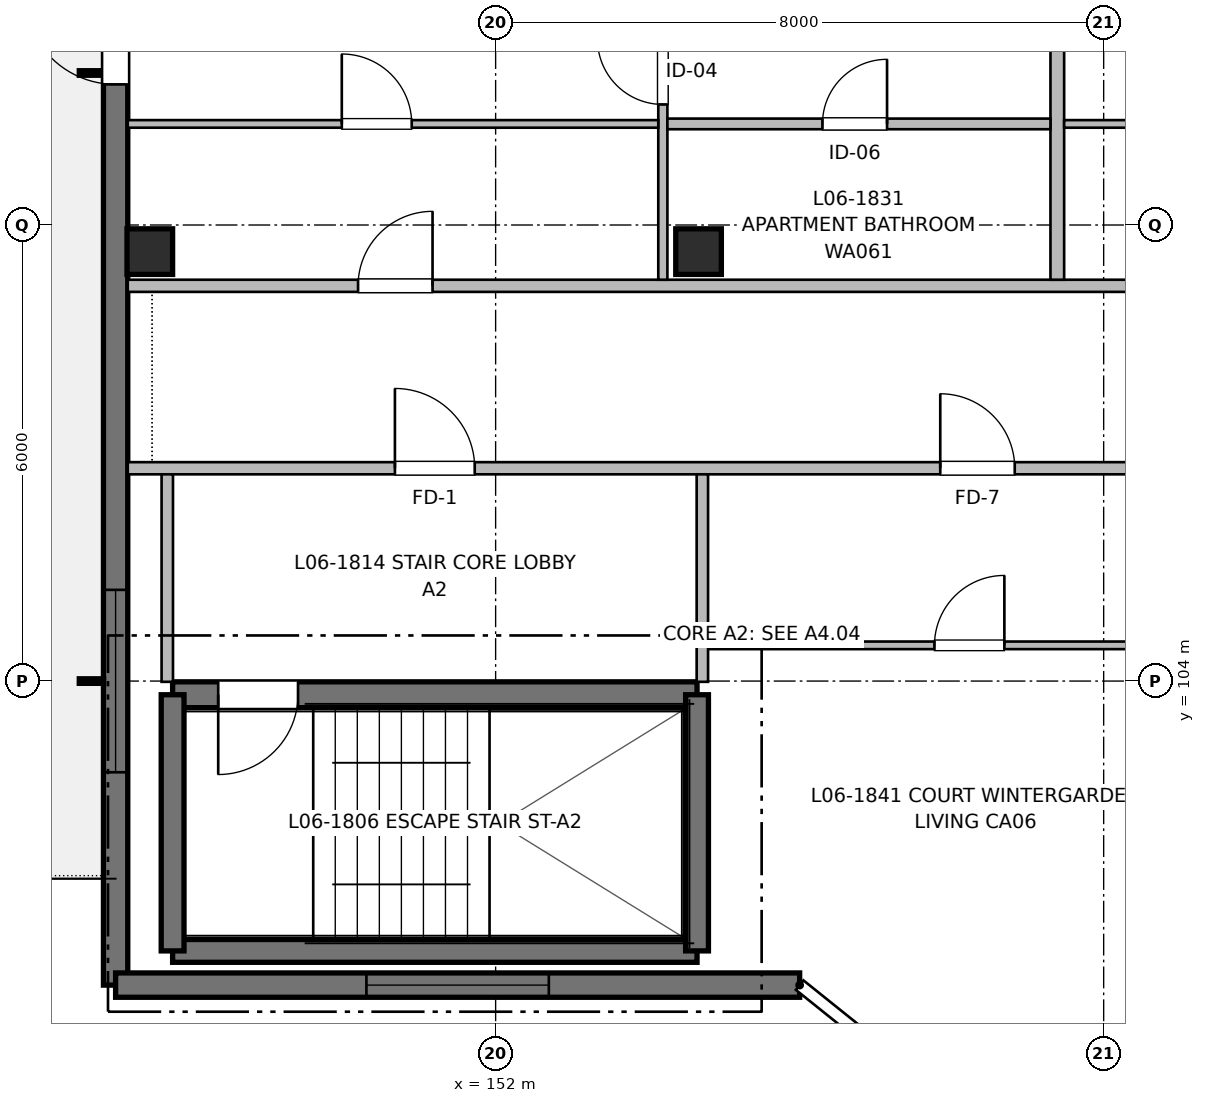
"""IFC4 building model, lengths in metres.
Left out: names, types, materials, properties, quantities, classifications, styles, units other than length and angle.
Written with IfcOpenShell. Run it as: python <this file> out.ifc"""

import sys

from ifc_helpers import new_model, si_unit, direction, frame, frame_2d, origin, origin_2d, place, context, subcontext, project, spatial, rectangle, extrude, element, fill, save


model = new_model("IFC4")
c1 = context("Model", 3, precision=1e-05, world=origin(), true_north=direction((0.0, 1.0)))
c2 = subcontext(c1, "Body", "Model", "MODEL_VIEW")
j1 = project(units=[si_unit("LENGTHUNIT", "METRE"), si_unit("PLANEANGLEUNIT", "RADIAN")], contexts=[c1])
p1 = place(None, origin())
s1 = spatial("IfcSite", under=j1, at=p1, CompositionType="ELEMENT")
p2 = place(p1, origin())
s2 = spatial("IfcBuilding", under=s1, at=p2, CompositionType="ELEMENT")
p3 = place(p2, frame((0.0, 0.0, 20.16)))
s3 = spatial("IfcBuildingStorey", under=s2, at=p3, CompositionType="ELEMENT", Elevation=20.16)
for number, where, z_axis, x_axis in (
    (1, (147.45, 109.65, 0.0), (0.0, 0.0, 1.0), (1.0, 0.0, 0.0)),
    (2, (154.67, 109.65, 0.0), (0.0, 0.0, 1.0), (1.0, 0.0, 0.0)),
):
    element("IfcColumn", number, at=place(p3, frame(where, z_axis=z_axis, x_axis=x_axis)), inside=s3, PredefinedType="COLUMN", context=c2, shape_type="SweptSolid", body=[
        extrude(rectangle(XDim=0.6, YDim=0.6, at=origin_2d()), origin(), (0.0, 0.0, 1.0), 3.2),
    ])
p4 = place(p3, frame((147.75, 100.45, 0.0), z_axis=(0.0, 0.0, 1.0), x_axis=(1.0, 0.0, 0.0)))
e3 = element("IfcWall", 3, at=p4, inside=s3, PredefinedType="SHEAR", context=c2, shape_type="SweptSolid", body=[
    extrude(rectangle(XDim=6.9, YDim=0.3, at=frame_2d((3.45, 0.0))), origin(), (0.0, 0.0, 1.0), 3.2),
])
p5 = place(p3, frame((154.65, 103.82, 0.0), z_axis=(0.0, 0.0, 1.0), x_axis=(-1.0, 0.0, 0.0)))
e4 = element("IfcWall", 4, at=p5, inside=s3, PredefinedType="SHEAR", context=c2, shape_type="SweptSolid", body=[
    extrude(rectangle(XDim=6.9, YDim=0.34, at=frame_2d((3.45, 0.0))), origin(), (0.0, 0.0, 1.0), 3.2),
])
p6 = place(p5, frame((5.25, 0.0, 0.0)))
e5 = element("IfcOpeningElement", 5, at=p6, cuts=e4, PredefinedType="OPENING", context=c2, shape_type="SweptSolid", body=[
    extrude(rectangle(XDim=1.05, YDim=2.15, at=frame_2d((0.525, 1.075))), frame((0.0, 0.18, 0.0), z_axis=(0.0, -1.0, 0.0), x_axis=(1.0, 0.0, 0.0)), (0.0, 0.0, 1.0), 0.36),
])
for number, where, z_axis, x_axis in (
    (6, (147.75, 103.82, 0.0), (0.0, 0.0, 1.0), (0.0, -1.0, 0.0)),
    (7, (154.65, 100.45, 0.0), (0.0, 0.0, 1.0), (0.0, 1.0, 0.0)),
):
    element("IfcWall", number, at=place(p3, frame(where, z_axis=z_axis, x_axis=x_axis)), inside=s3, PredefinedType="SHEAR", context=c2, shape_type="SweptSolid", body=[
        extrude(rectangle(XDim=3.37, YDim=0.3, at=frame_2d((1.685, 0.0))), origin(), (0.0, 0.0, 1.0), 3.2),
    ])
p7 = place(p3, frame((147.0, 100.0, 0.0), z_axis=(0.0, 0.0, 1.0), x_axis=(0.0, 1.0, 0.0)))
e8 = element("IfcWall", 8, at=p7, inside=s3, PredefinedType="SHEAR", context=c2, shape_type="SweptSolid", body=[
    extrude(rectangle(XDim=16.0, YDim=0.32, at=frame_2d((8.0, 0.0))), origin(), (0.0, 0.0, 1.0), 2.98),
])
p8 = place(p7, frame((2.8, 0.0, 0.72)))
e9 = element("IfcOpeningElement", 9, at=p8, cuts=e8, PredefinedType="OPENING", context=c2, shape_type="SweptSolid", body=[
    extrude(rectangle(XDim=2.4, YDim=1.5, at=frame_2d((1.2, 0.75))), frame((0.0, 0.17, 0.0), z_axis=(0.0, -1.0, 0.0), x_axis=(1.0, 0.0, 0.0)), (0.0, 0.0, 1.0), 0.34),
])
p9 = place(p7, frame((11.85, 0.0, 0.0)))
e10 = element("IfcOpeningElement", 10, at=p9, cuts=e8, PredefinedType="OPENING", context=c2, shape_type="SweptSolid", body=[
    extrude(rectangle(XDim=1.2, YDim=2.2, at=frame_2d((0.6, 1.1))), frame((0.0, 0.17, 0.0), z_axis=(0.0, -1.0, 0.0), x_axis=(1.0, 0.0, 0.0)), (0.0, 0.0, 1.0), 0.34),
])
p10 = place(p3, frame((156.0, 100.0, 0.0), z_axis=(0.0, 0.0, 1.0), x_axis=(-1.0, 0.0, 0.0)))
e11 = element("IfcWall", 11, at=p10, inside=s3, PredefinedType="SHEAR", context=c2, shape_type="SweptSolid", body=[
    extrude(rectangle(XDim=9.0, YDim=0.32, at=frame_2d((4.5, 0.0))), origin(), (0.0, 0.0, 1.0), 2.98),
])
p11 = place(p10, frame((3.3, 0.0, 0.72)))
e12 = element("IfcOpeningElement", 12, at=p11, cuts=e11, PredefinedType="OPENING", context=c2, shape_type="SweptSolid", body=[
    extrude(rectangle(XDim=2.4, YDim=1.5, at=frame_2d((1.2, 0.75))), frame((0.0, 0.17, 0.0), z_axis=(0.0, -1.0, 0.0), x_axis=(1.0, 0.0, 0.0)), (0.0, 0.0, 1.0), 0.34),
])
p12 = place(p3, frame((147.16, 106.8, 0.0), z_axis=(0.0, 0.0, 1.0), x_axis=(1.0, 0.0, 0.0)))
e13 = element("IfcWall", 13, at=p12, inside=s3, PredefinedType="PARTITIONING", context=c2, shape_type="SweptSolid", body=[
    extrude(rectangle(XDim=27.64, YDim=0.16, at=frame_2d((13.82, 0.0))), origin(), (0.0, 0.0, 1.0), 2.935),
])
p13 = place(p12, frame((3.515, 0.0, 0.0)))
e14 = element("IfcOpeningElement", 14, at=p13, cuts=e13, PredefinedType="OPENING", context=c2, shape_type="SweptSolid", body=[
    extrude(rectangle(XDim=1.05, YDim=2.15, at=frame_2d((0.525, 1.075))), frame((0.0, 0.09, 0.0), z_axis=(0.0, -1.0, 0.0), x_axis=(1.0, 0.0, 0.0)), (0.0, 0.0, 1.0), 0.18),
])
p14 = place(p12, frame((10.69, 0.0, 0.0)))
e15 = element("IfcOpeningElement", 15, at=p14, cuts=e13, PredefinedType="OPENING", context=c2, shape_type="SweptSolid", body=[
    extrude(rectangle(XDim=0.98, YDim=2.15, at=frame_2d((0.49, 1.075))), frame((0.0, 0.09, 0.0), z_axis=(0.0, -1.0, 0.0), x_axis=(1.0, 0.0, 0.0)), (0.0, 0.0, 1.0), 0.18),
])
p15 = place(p3, frame((147.16, 109.2, 0.0), z_axis=(0.0, 0.0, 1.0), x_axis=(1.0, 0.0, 0.0)))
e16 = element("IfcWall", 16, at=p15, inside=s3, PredefinedType="PARTITIONING", context=c2, shape_type="SweptSolid", body=[
    extrude(rectangle(XDim=36.68, YDim=0.16, at=frame_2d((18.34, 0.0))), origin(), (0.0, 0.0, 1.0), 2.935),
])
p16 = place(p15, frame((3.03, 0.0, 0.0)))
e17 = element("IfcOpeningElement", 17, at=p16, cuts=e16, PredefinedType="OPENING", context=c2, shape_type="SweptSolid", body=[
    extrude(rectangle(XDim=0.98, YDim=2.15, at=frame_2d((0.49, 1.075))), frame((0.0, 0.09, 0.0), z_axis=(0.0, -1.0, 0.0), x_axis=(1.0, 0.0, 0.0)), (0.0, 0.0, 1.0), 0.18),
])
p17 = place(p15, frame((15.72, 0.0, 0.0)))
e18 = element("IfcOpeningElement", 18, at=p17, cuts=e16, PredefinedType="OPENING", context=c2, shape_type="SweptSolid", body=[
    extrude(rectangle(XDim=0.98, YDim=2.15, at=frame_2d((0.49, 1.075))), frame((0.0, 0.09, 0.0), z_axis=(0.0, -1.0, 0.0), x_axis=(1.0, 0.0, 0.0)), (0.0, 0.0, 1.0), 0.18),
])
p18 = place(p15, frame((27.17, 0.0, 0.0)))
e19 = element("IfcOpeningElement", 19, at=p18, cuts=e16, PredefinedType="OPENING", context=c2, shape_type="SweptSolid", body=[
    extrude(rectangle(XDim=0.98, YDim=2.15, at=frame_2d((0.49, 1.075))), frame((0.0, 0.09, 0.0), z_axis=(0.0, -1.0, 0.0), x_axis=(1.0, 0.0, 0.0)), (0.0, 0.0, 1.0), 0.18),
])
for number, where, z_axis, x_axis in (
    (20, (147.68, 103.99, 0.0), (0.0, 0.0, 1.0), (0.0, 1.0, 0.0)),
    (21, (154.72, 103.99, 0.0), (0.0, 0.0, 1.0), (0.0, 1.0, 0.0)),
):
    element("IfcWall", number, at=place(p3, frame(where, z_axis=z_axis, x_axis=x_axis)), inside=s3, PredefinedType="PARTITIONING", context=c2, shape_type="SweptSolid", body=[
        extrude(rectangle(XDim=2.73, YDim=0.15, at=frame_2d((1.365, 0.0))), origin(), (0.0, 0.0, 1.0), 2.935),
    ])
p19 = place(p3, frame((159.39, 109.28, 0.0), z_axis=(0.0, 0.0, 1.0), x_axis=(0.0, 1.0, 0.0)))
e22 = element("IfcWall", 22, at=p19, inside=s3, PredefinedType="PARTITIONING", context=c2, shape_type="SweptSolid", body=[
    extrude(rectangle(XDim=6.6, YDim=0.18, at=frame_2d((3.3, 0.0))), origin(), (0.0, 0.0, 1.0), 2.935),
])
p20 = place(p3, frame((154.2, 109.28, 0.0), z_axis=(0.0, 0.0, 1.0), x_axis=(0.0, 1.0, 0.0)))
e23 = element("IfcWall", 23, at=p20, inside=s3, PredefinedType="PARTITIONING", context=c2, shape_type="SweptSolid", body=[
    extrude(rectangle(XDim=6.6, YDim=0.12, at=frame_2d((3.3, 0.0))), origin(), (0.0, 0.0, 1.0), 2.935),
])
p21 = place(p20, frame((2.306, 0.0, 0.0)))
e24 = element("IfcOpeningElement", 24, at=p21, cuts=e23, PredefinedType="OPENING", context=c2, shape_type="SweptSolid", body=[
    extrude(rectangle(XDim=0.86, YDim=2.1, at=frame_2d((0.43, 1.05))), frame((0.0, 0.07, 0.0), z_axis=(0.0, -1.0, 0.0), x_axis=(1.0, 0.0, 0.0)), (0.0, 0.0, 1.0), 0.14),
])
p22 = place(p20, frame((4.097, 0.0, 0.0)))
e25 = element("IfcOpeningElement", 25, at=p22, cuts=e23, PredefinedType="OPENING", context=c2, shape_type="SweptSolid", body=[
    extrude(rectangle(XDim=0.9, YDim=2.1, at=frame_2d((0.45, 1.05))), frame((0.0, 0.07, 0.0), z_axis=(0.0, -1.0, 0.0), x_axis=(1.0, 0.0, 0.0)), (0.0, 0.0, 1.0), 0.14),
])
p23 = place(p3, frame((154.26, 111.33, 0.0), z_axis=(0.0, 0.0, 1.0), x_axis=(1.0, 0.0, 0.0)))
e26 = element("IfcWall", 26, at=p23, inside=s3, PredefinedType="PARTITIONING", context=c2, shape_type="SweptSolid", body=[
    extrude(rectangle(XDim=5.04, YDim=0.14, at=frame_2d((2.52, 0.0))), origin(), (0.0, 0.0, 1.0), 2.935),
])
p24 = place(p23, frame((2.04, 0.0, 0.0)))
e27 = element("IfcOpeningElement", 27, at=p24, cuts=e26, PredefinedType="OPENING", context=c2, shape_type="SweptSolid", body=[
    extrude(rectangle(XDim=0.85, YDim=2.05, at=frame_2d((0.425, 1.025))), frame((0.0, 0.08, 0.0), z_axis=(0.0, -1.0, 0.0), x_axis=(1.0, 0.0, 0.0)), (0.0, 0.0, 1.0), 0.16),
])
p25 = place(p3, frame((147.16, 111.33, 0.0), z_axis=(0.0, 0.0, 1.0), x_axis=(1.0, 0.0, 0.0)))
e28 = element("IfcWall", 28, at=p25, inside=s3, PredefinedType="PARTITIONING", context=c2, shape_type="SweptSolid", body=[
    extrude(rectangle(XDim=6.98, YDim=0.1, at=frame_2d((3.49, 0.0))), origin(), (0.0, 0.0, 1.0), 2.935),
])
p26 = place(p25, frame((2.816, 0.0, 0.0)))
e29 = element("IfcOpeningElement", 29, at=p26, cuts=e28, PredefinedType="OPENING", context=c2, shape_type="SweptSolid", body=[
    extrude(rectangle(XDim=0.92, YDim=2.1, at=frame_2d((0.46, 1.05))), frame((0.0, 0.06, 0.0), z_axis=(0.0, -1.0, 0.0), x_axis=(1.0, 0.0, 0.0)), (0.0, 0.0, 1.0), 0.12),
])
p27 = place(p3, frame((159.48, 111.33, 0.0), z_axis=(0.0, 0.0, 1.0), x_axis=(1.0, 0.0, 0.0)))
e30 = element("IfcWall", 30, at=p27, inside=s3, PredefinedType="PARTITIONING", context=c2, shape_type="SweptSolid", body=[
    extrude(rectangle(XDim=6.92, YDim=0.1, at=frame_2d((3.46, 0.0))), origin(), (0.0, 0.0, 1.0), 2.935),
])
p28 = place(p27, frame((2.792, 0.0, 0.0)))
e31 = element("IfcOpeningElement", 31, at=p28, cuts=e30, PredefinedType="OPENING", context=c2, shape_type="SweptSolid", body=[
    extrude(rectangle(XDim=0.92, YDim=2.1, at=frame_2d((0.46, 1.05))), frame((0.0, 0.06, 0.0), z_axis=(0.0, -1.0, 0.0), x_axis=(1.0, 0.0, 0.0)), (0.0, 0.0, 1.0), 0.12),
])
p29 = place(p3, frame((154.8, 104.47, 0.0), z_axis=(0.0, 0.0, 1.0), x_axis=(1.0, 0.0, 0.0)))
e32 = element("IfcWall", 32, at=p29, inside=s3, PredefinedType="PARTITIONING", context=c2, shape_type="SweptSolid", body=[
    extrude(rectangle(XDim=7.02, YDim=0.1, at=frame_2d((3.51, 0.0))), origin(), (0.0, 0.0, 1.0), 2.935),
])
p30 = place(p29, frame((2.974, 0.0, 0.0)))
e33 = element("IfcOpeningElement", 33, at=p30, cuts=e32, PredefinedType="OPENING", context=c2, shape_type="SweptSolid", body=[
    extrude(rectangle(XDim=0.92, YDim=2.1, at=frame_2d((0.46, 1.05))), frame((0.0, 0.06, 0.0), z_axis=(0.0, -1.0, 0.0), x_axis=(1.0, 0.0, 0.0)), (0.0, 0.0, 1.0), 0.12),
])
p31 = place(p6, origin())
e34 = element("IfcDoor", 34, at=p31, inside=s3, OperationType="SINGLE_SWING_RIGHT", PredefinedType="DOOR", context=c2, shape_type="SweptSolid", body=[
    extrude(rectangle(XDim=1.05, YDim=2.15, at=frame_2d((0.525, 1.075))), frame((0.0, 0.025, 0.0), z_axis=(0.0, -1.0, 0.0), x_axis=(1.0, 0.0, 0.0)), (0.0, 0.0, 1.0), 0.05),
])
fill(e5, e34)
p32 = place(p8, origin())
e35 = element("IfcWindow", 35, at=p32, inside=s3, PartitioningType="SINGLE_PANEL", PredefinedType="WINDOW", context=c2, shape_type="SweptSolid", body=[
    extrude(rectangle(XDim=2.4, YDim=1.5, at=frame_2d((1.2, 0.75))), frame((0.0, 0.03, 0.0), z_axis=(0.0, -1.0, 0.0), x_axis=(1.0, 0.0, 0.0)), (0.0, 0.0, 1.0), 0.06),
])
fill(e9, e35)
p33 = place(p9, origin())
e36 = element("IfcDoor", 36, at=p33, inside=s3, OperationType="SINGLE_SWING_RIGHT", PredefinedType="DOOR", context=c2, shape_type="SweptSolid", body=[
    extrude(rectangle(XDim=1.2, YDim=2.2, at=frame_2d((0.6, 1.1))), frame((0.0, 0.025, 0.0), z_axis=(0.0, -1.0, 0.0), x_axis=(1.0, 0.0, 0.0)), (0.0, 0.0, 1.0), 0.05),
])
fill(e10, e36)
p34 = place(p11, origin())
e37 = element("IfcWindow", 37, at=p34, inside=s3, PartitioningType="SINGLE_PANEL", PredefinedType="WINDOW", context=c2, shape_type="SweptSolid", body=[
    extrude(rectangle(XDim=2.4, YDim=1.5, at=frame_2d((1.2, 0.75))), frame((0.0, 0.03, 0.0), z_axis=(0.0, -1.0, 0.0), x_axis=(1.0, 0.0, 0.0)), (0.0, 0.0, 1.0), 0.06),
])
fill(e12, e37)
p35 = place(p13, origin())
e38 = element("IfcDoor", 38, at=p35, inside=s3, OperationType="SINGLE_SWING_LEFT", PredefinedType="DOOR", context=c2, shape_type="SweptSolid", body=[
    extrude(rectangle(XDim=1.05, YDim=2.15, at=frame_2d((0.525, 1.075))), frame((0.0, 0.025, 0.0), z_axis=(0.0, -1.0, 0.0), x_axis=(1.0, 0.0, 0.0)), (0.0, 0.0, 1.0), 0.05),
])
fill(e14, e38)
p36 = place(p16, origin())
e39 = element("IfcDoor", 39, at=p36, inside=s3, OperationType="SINGLE_SWING_RIGHT", PredefinedType="DOOR", context=c2, shape_type="SweptSolid", body=[
    extrude(rectangle(XDim=0.98, YDim=2.15, at=frame_2d((0.49, 1.075))), frame((0.0, 0.025, 0.0), z_axis=(0.0, -1.0, 0.0), x_axis=(1.0, 0.0, 0.0)), (0.0, 0.0, 1.0), 0.05),
])
fill(e17, e39)
p37 = place(p26, origin())
e40 = element("IfcDoor", 40, at=p37, inside=s3, OperationType="SINGLE_SWING_LEFT", PredefinedType="DOOR", context=c2, shape_type="SweptSolid", body=[
    extrude(rectangle(XDim=0.92, YDim=2.1, at=frame_2d((0.46, 1.05))), frame((0.0, 0.025, 0.0), z_axis=(0.0, -1.0, 0.0), x_axis=(1.0, 0.0, 0.0)), (0.0, 0.0, 1.0), 0.05),
])
fill(e29, e40)
p38 = place(p21, origin())
e41 = element("IfcDoor", 41, at=p38, inside=s3, OperationType="SINGLE_SWING_RIGHT", PredefinedType="DOOR", context=c2, shape_type="SweptSolid", body=[
    extrude(rectangle(XDim=0.86, YDim=2.1, at=frame_2d((0.43, 1.05))), frame((0.0, 0.025, 0.0), z_axis=(0.0, -1.0, 0.0), x_axis=(1.0, 0.0, 0.0)), (0.0, 0.0, 1.0), 0.05),
])
fill(e24, e41)
p39 = place(p24, origin())
e42 = element("IfcDoor", 42, at=p39, inside=s3, OperationType="SINGLE_SWING_RIGHT", PredefinedType="DOOR", context=c2, shape_type="SweptSolid", body=[
    extrude(rectangle(XDim=0.85, YDim=2.05, at=frame_2d((0.425, 1.025))), frame((0.0, 0.025, 0.0), z_axis=(0.0, -1.0, 0.0), x_axis=(1.0, 0.0, 0.0)), (0.0, 0.0, 1.0), 0.05),
])
fill(e27, e42)
p40 = place(p14, origin())
e43 = element("IfcDoor", 43, at=p40, inside=s3, OperationType="SINGLE_SWING_LEFT", PredefinedType="DOOR", context=c2, shape_type="SweptSolid", body=[
    extrude(rectangle(XDim=0.98, YDim=2.15, at=frame_2d((0.49, 1.075))), frame((0.0, 0.025, 0.0), z_axis=(0.0, -1.0, 0.0), x_axis=(1.0, 0.0, 0.0)), (0.0, 0.0, 1.0), 0.05),
])
fill(e15, e43)
p41 = place(p30, origin())
e44 = element("IfcDoor", 44, at=p41, inside=s3, OperationType="SINGLE_SWING_RIGHT", PredefinedType="DOOR", context=c2, shape_type="SweptSolid", body=[
    extrude(rectangle(XDim=0.92, YDim=2.1, at=frame_2d((0.46, 1.05))), frame((0.0, 0.025, 0.0), z_axis=(0.0, -1.0, 0.0), x_axis=(1.0, 0.0, 0.0)), (0.0, 0.0, 1.0), 0.05),
])
fill(e33, e44)
save(model, sys.argv[1])
